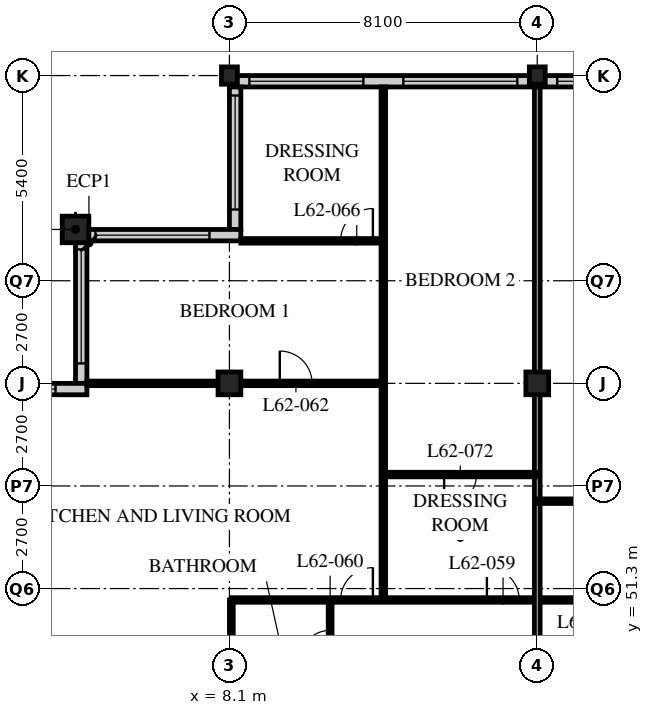
"""IFC4 building model, lengths in metres.
Left out: names, types, materials, properties, quantities, classifications, styles, units other than length and angle.
Written with IfcOpenShell. Run it as: python <this file> out.ifc"""

import sys

from ifc_helpers import new_model, si_unit, direction, frame, frame_2d, origin, origin_2d, place, context, subcontext, project, spatial, rectangle, hollow_rectangle, i_section, extrude, element, fill, save


model = new_model("IFC4")
c1 = context("Model", 3, precision=1e-05, world=origin(), true_north=direction((0.0, 1.0)))
c2 = subcontext(c1, "Body", "Model", "MODEL_VIEW")
j1 = project(units=[si_unit("LENGTHUNIT", "METRE"), si_unit("PLANEANGLEUNIT", "RADIAN")], contexts=[c1])
p1 = place(None, origin())
s1 = spatial("IfcSite", under=j1, at=p1, CompositionType="ELEMENT")
p2 = place(p1, origin())
s2 = spatial("IfcBuilding", under=s1, at=p2, CompositionType="ELEMENT")
p3 = place(p2, frame((0.0, 0.0, 242.4)))
s3 = spatial("IfcBuildingStorey", under=s2, at=p3, CompositionType="ELEMENT", Elevation=242.4)
p4 = place(p3, frame((4.05, 60.75, 0.0), z_axis=(0.0, 0.0, 1.0), x_axis=(1.0, 0.0, 0.0)))
e1 = element("IfcColumn", 1, at=p4, inside=s3, PredefinedType="COLUMN", context=c2, shape_type="SweptSolid", body=[
    extrude(hollow_rectangle(XDim=0.7, YDim=0.7, WallThickness=0.07, at=origin_2d()), origin(), (0.0, 0.0, 1.0), 3.9),
])
p5 = place(p3, frame((8.1, 56.7, 0.0), z_axis=(0.0, 0.0, 1.0), x_axis=(1.0, 0.0, 0.0)))
e2 = element("IfcColumn", 2, at=p5, inside=s3, PredefinedType="COLUMN", context=c2, shape_type="SweptSolid", body=[
    extrude(hollow_rectangle(XDim=0.6, YDim=0.6, WallThickness=0.05, at=origin_2d()), origin(), (0.0, 0.0, 1.0), 3.9),
])
p6 = place(p3, frame((8.1, 64.8, 0.0), z_axis=(0.0, 0.0, 1.0), x_axis=(1.0, 0.0, 0.0)))
e3 = element("IfcColumn", 3, at=p6, inside=s3, PredefinedType="COLUMN", context=c2, shape_type="SweptSolid", body=[
    extrude(i_section(OverallWidth=0.418, OverallDepth=0.456, WebThickness=0.042, FlangeThickness=0.067, FilletRadius=0.015, at=origin_2d()), origin(), (0.0, 0.0, 1.0), 3.9),
])
p7 = place(p3, frame((16.2, 56.7, 0.0), z_axis=(0.0, 0.0, 1.0), x_axis=(1.0, 0.0, 0.0)))
e4 = element("IfcColumn", 4, at=p7, inside=s3, PredefinedType="COLUMN", context=c2, shape_type="SweptSolid", body=[
    extrude(hollow_rectangle(XDim=0.6, YDim=0.6, WallThickness=0.05, at=origin_2d()), origin(), (0.0, 0.0, 1.0), 3.9),
])
p8 = place(p3, frame((16.2, 64.8, 0.0), z_axis=(0.0, 0.0, 1.0), x_axis=(1.0, 0.0, 0.0)))
e5 = element("IfcColumn", 5, at=p8, inside=s3, PredefinedType="COLUMN", context=c2, shape_type="SweptSolid", body=[
    extrude(i_section(OverallWidth=0.418, OverallDepth=0.456, WebThickness=0.042, FlangeThickness=0.067, FilletRadius=0.015, at=origin_2d()), origin(), (0.0, 0.0, 1.0), 3.9),
])
p9 = place(p3, frame((48.3, 64.65, 0.0), z_axis=(0.0, 0.0, 1.0), x_axis=(-1.0, 0.0, 0.0)))
e6 = element("IfcWall", 6, at=p9, inside=s3, PredefinedType="SOLIDWALL", context=c2, shape_type="SweptSolid", body=[
    extrude(rectangle(XDim=40.2, YDim=0.3, at=frame_2d((20.1, 0.0))), origin(), (0.0, 0.0, 1.0), 3.69),
])
p10 = place(p9, frame((0.225, 0.0, 0.6)))
e7 = element("IfcOpeningElement", 7, at=p10, cuts=e6, PredefinedType="OPENING", context=c2, shape_type="SweptSolid", body=[
    extrude(rectangle(XDim=3.0, YDim=2.3, at=frame_2d((1.5, 1.15))), frame((0.0, 0.16, 0.0), z_axis=(0.0, -1.0, 0.0), x_axis=(1.0, 0.0, 0.0)), (0.0, 0.0, 1.0), 0.32),
])
p11 = place(p9, frame((4.275, 0.0, 0.6)))
e8 = element("IfcOpeningElement", 8, at=p11, cuts=e6, PredefinedType="OPENING", context=c2, shape_type="SweptSolid", body=[
    extrude(rectangle(XDim=3.0, YDim=2.3, at=frame_2d((1.5, 1.15))), frame((0.0, 0.16, 0.0), z_axis=(0.0, -1.0, 0.0), x_axis=(1.0, 0.0, 0.0)), (0.0, 0.0, 1.0), 0.32),
])
p12 = place(p9, frame((8.325, 0.0, 0.6)))
e9 = element("IfcOpeningElement", 9, at=p12, cuts=e6, PredefinedType="OPENING", context=c2, shape_type="SweptSolid", body=[
    extrude(rectangle(XDim=3.0, YDim=2.3, at=frame_2d((1.5, 1.15))), frame((0.0, 0.16, 0.0), z_axis=(0.0, -1.0, 0.0), x_axis=(1.0, 0.0, 0.0)), (0.0, 0.0, 1.0), 0.32),
])
p13 = place(p9, frame((12.375, 0.0, 0.6)))
e10 = element("IfcOpeningElement", 10, at=p13, cuts=e6, PredefinedType="OPENING", context=c2, shape_type="SweptSolid", body=[
    extrude(rectangle(XDim=3.0, YDim=2.3, at=frame_2d((1.5, 1.15))), frame((0.0, 0.16, 0.0), z_axis=(0.0, -1.0, 0.0), x_axis=(1.0, 0.0, 0.0)), (0.0, 0.0, 1.0), 0.32),
])
p14 = place(p9, frame((16.425, 0.0, 0.6)))
e11 = element("IfcOpeningElement", 11, at=p14, cuts=e6, PredefinedType="OPENING", context=c2, shape_type="SweptSolid", body=[
    extrude(rectangle(XDim=3.0, YDim=2.3, at=frame_2d((1.5, 1.15))), frame((0.0, 0.16, 0.0), z_axis=(0.0, -1.0, 0.0), x_axis=(1.0, 0.0, 0.0)), (0.0, 0.0, 1.0), 0.32),
])
p15 = place(p9, frame((20.475, 0.0, 0.6)))
e12 = element("IfcOpeningElement", 12, at=p15, cuts=e6, PredefinedType="OPENING", context=c2, shape_type="SweptSolid", body=[
    extrude(rectangle(XDim=3.0, YDim=2.3, at=frame_2d((1.5, 1.15))), frame((0.0, 0.16, 0.0), z_axis=(0.0, -1.0, 0.0), x_axis=(1.0, 0.0, 0.0)), (0.0, 0.0, 1.0), 0.32),
])
p16 = place(p9, frame((24.525, 0.0, 0.6)))
e13 = element("IfcOpeningElement", 13, at=p16, cuts=e6, PredefinedType="OPENING", context=c2, shape_type="SweptSolid", body=[
    extrude(rectangle(XDim=3.0, YDim=2.3, at=frame_2d((1.5, 1.15))), frame((0.0, 0.16, 0.0), z_axis=(0.0, -1.0, 0.0), x_axis=(1.0, 0.0, 0.0)), (0.0, 0.0, 1.0), 0.32),
])
p17 = place(p9, frame((28.575, 0.0, 0.6)))
e14 = element("IfcOpeningElement", 14, at=p17, cuts=e6, PredefinedType="OPENING", context=c2, shape_type="SweptSolid", body=[
    extrude(rectangle(XDim=3.0, YDim=2.3, at=frame_2d((1.5, 1.15))), frame((0.0, 0.16, 0.0), z_axis=(0.0, -1.0, 0.0), x_axis=(1.0, 0.0, 0.0)), (0.0, 0.0, 1.0), 0.32),
])
p18 = place(p9, frame((32.625, 0.0, 0.6)))
e15 = element("IfcOpeningElement", 15, at=p18, cuts=e6, PredefinedType="OPENING", context=c2, shape_type="SweptSolid", body=[
    extrude(rectangle(XDim=3.0, YDim=2.3, at=frame_2d((1.5, 1.15))), frame((0.0, 0.16, 0.0), z_axis=(0.0, -1.0, 0.0), x_axis=(1.0, 0.0, 0.0)), (0.0, 0.0, 1.0), 0.32),
])
p19 = place(p9, frame((36.675, 0.0, 0.6)))
e16 = element("IfcOpeningElement", 16, at=p19, cuts=e6, PredefinedType="OPENING", context=c2, shape_type="SweptSolid", body=[
    extrude(rectangle(XDim=3.0, YDim=2.3, at=frame_2d((1.5, 1.15))), frame((0.0, 0.16, 0.0), z_axis=(0.0, -1.0, 0.0), x_axis=(1.0, 0.0, 0.0)), (0.0, 0.0, 1.0), 0.32),
])
p20 = place(p3, frame((8.25, 64.5, 0.0), z_axis=(0.0, 0.0, 1.0), x_axis=(0.0, -1.0, 0.0)))
e17 = element("IfcWall", 17, at=p20, inside=s3, PredefinedType="SOLIDWALL", context=c2, shape_type="SweptSolid", body=[
    extrude(rectangle(XDim=3.75, YDim=0.3, at=frame_2d((1.875, 0.0))), origin(), (0.0, 0.0, 1.0), 3.69),
])
p21 = place(p20, frame((0.225, 0.0, 0.6)))
e18 = element("IfcOpeningElement", 18, at=p21, cuts=e17, PredefinedType="OPENING", context=c2, shape_type="SweptSolid", body=[
    extrude(rectangle(XDim=3.0, YDim=2.3, at=frame_2d((1.5, 1.15))), frame((0.0, 0.16, 0.0), z_axis=(0.0, -1.0, 0.0), x_axis=(1.0, 0.0, 0.0)), (0.0, 0.0, 1.0), 0.32),
])
p22 = place(p3, frame((8.4, 60.6, 0.0), z_axis=(0.0, 0.0, 1.0), x_axis=(-1.0, 0.0, 0.0)))
e19 = element("IfcWall", 19, at=p22, inside=s3, PredefinedType="SOLIDWALL", context=c2, shape_type="SweptSolid", body=[
    extrude(rectangle(XDim=4.35, YDim=0.3, at=frame_2d((2.175, 0.0))), origin(), (0.0, 0.0, 1.0), 3.69),
])
p23 = place(p22, frame((0.825, 0.0, 0.6)))
e20 = element("IfcOpeningElement", 20, at=p23, cuts=e19, PredefinedType="OPENING", context=c2, shape_type="SweptSolid", body=[
    extrude(rectangle(XDim=3.0, YDim=2.3, at=frame_2d((1.5, 1.15))), frame((0.0, 0.16, 0.0), z_axis=(0.0, -1.0, 0.0), x_axis=(1.0, 0.0, 0.0)), (0.0, 0.0, 1.0), 0.32),
])
p24 = place(p3, frame((4.2, 60.45, 0.0), z_axis=(0.0, 0.0, 1.0), x_axis=(0.0, -1.0, 0.0)))
e21 = element("IfcWall", 21, at=p24, inside=s3, PredefinedType="SOLIDWALL", context=c2, shape_type="SweptSolid", body=[
    extrude(rectangle(XDim=3.75, YDim=0.3, at=frame_2d((1.875, 0.0))), origin(), (0.0, 0.0, 1.0), 3.69),
])
p25 = place(p24, frame((0.225, 0.0, 0.6)))
e22 = element("IfcOpeningElement", 22, at=p25, cuts=e21, PredefinedType="OPENING", context=c2, shape_type="SweptSolid", body=[
    extrude(rectangle(XDim=3.0, YDim=2.3, at=frame_2d((1.5, 1.15))), frame((0.0, 0.16, 0.0), z_axis=(0.0, -1.0, 0.0), x_axis=(1.0, 0.0, 0.0)), (0.0, 0.0, 1.0), 0.32),
])
p26 = place(p3, frame((4.35, 56.55, 0.0), z_axis=(0.0, 0.0, 1.0), x_axis=(-1.0, 0.0, 0.0)))
e23 = element("IfcWall", 23, at=p26, inside=s3, PredefinedType="SOLIDWALL", context=c2, shape_type="SweptSolid", body=[
    extrude(rectangle(XDim=4.35, YDim=0.3, at=frame_2d((2.175, 0.0))), origin(), (0.0, 0.0, 1.0), 3.69),
])
p27 = place(p26, frame((0.825, 0.0, 0.6)))
e24 = element("IfcOpeningElement", 24, at=p27, cuts=e23, PredefinedType="OPENING", context=c2, shape_type="SweptSolid", body=[
    extrude(rectangle(XDim=3.0, YDim=2.3, at=frame_2d((1.5, 1.15))), frame((0.0, 0.16, 0.0), z_axis=(0.0, -1.0, 0.0), x_axis=(1.0, 0.0, 0.0)), (0.0, 0.0, 1.0), 0.32),
])
p28 = place(p3, frame((10.75, 48.6, 0.0), z_axis=(0.0, 0.0, 1.0), x_axis=(0.0, 1.0, 0.0)))
e25 = element("IfcWall", 25, at=p28, inside=s3, PredefinedType="PARTITIONING", context=c2, shape_type="SweptSolid", body=[
    extrude(rectangle(XDim=2.4, YDim=0.1, at=frame_2d((1.2, 0.0))), origin(), (0.0, 0.0, 1.0), 3.69),
])
p29 = place(p28, frame((0.8, 0.0, 0.0)))
e26 = element("IfcOpeningElement", 26, at=p29, cuts=e25, PredefinedType="OPENING", context=c2, shape_type="SweptSolid", body=[
    extrude(rectangle(XDim=0.8, YDim=2.1, at=frame_2d((0.4, 1.05))), frame((0.0, 0.06, 0.0), z_axis=(0.0, -1.0, 0.0), x_axis=(1.0, 0.0, 0.0)), (0.0, 0.0, 1.0), 0.12),
])
p30 = place(p3, frame((8.15, 48.6, 0.0), z_axis=(0.0, 0.0, 1.0), x_axis=(0.0, 1.0, 0.0)))
e27 = element("IfcWall", 27, at=p30, inside=s3, PredefinedType="PARTITIONING", context=c2, shape_type="SweptSolid", body=[
    extrude(rectangle(XDim=2.4, YDim=0.1, at=frame_2d((1.2, 0.0))), origin(), (0.0, 0.0, 1.0), 2.928),
])
p31 = place(p3, frame((8.15, 51.0, 0.0), z_axis=(0.0, 0.0, 1.0), x_axis=(1.0, 0.0, 0.0)))
e28 = element("IfcWall", 28, at=p31, inside=s3, PredefinedType="PARTITIONING", context=c2, shape_type="SweptSolid", body=[
    extrude(rectangle(XDim=40.4, YDim=0.12, at=frame_2d((20.2, 0.0))), origin(), (0.0, 0.0, 1.0), 3.69),
])
p32 = place(p31, frame((9.025, 0.0, 0.0)))
e29 = element("IfcOpeningElement", 29, at=p32, cuts=e28, PredefinedType="OPENING", context=c2, shape_type="SweptSolid", body=[
    extrude(rectangle(XDim=0.85, YDim=2.1, at=frame_2d((0.425, 1.05))), frame((0.0, 0.07, 0.0), z_axis=(0.0, -1.0, 0.0), x_axis=(1.0, 0.0, 0.0)), (0.0, 0.0, 1.0), 0.14),
])
p33 = place(p31, frame((16.475, 0.0, 0.0)))
e30 = element("IfcOpeningElement", 30, at=p33, cuts=e28, PredefinedType="OPENING", context=c2, shape_type="SweptSolid", body=[
    extrude(rectangle(XDim=0.85, YDim=2.1, at=frame_2d((0.425, 1.05))), frame((0.0, 0.07, 0.0), z_axis=(0.0, -1.0, 0.0), x_axis=(1.0, 0.0, 0.0)), (0.0, 0.0, 1.0), 0.14),
])
p34 = place(p31, frame((20.525, 0.0, 0.0)))
e31 = element("IfcOpeningElement", 31, at=p34, cuts=e28, PredefinedType="OPENING", context=c2, shape_type="SweptSolid", body=[
    extrude(rectangle(XDim=0.85, YDim=2.1, at=frame_2d((0.425, 1.05))), frame((0.0, 0.07, 0.0), z_axis=(0.0, -1.0, 0.0), x_axis=(1.0, 0.0, 0.0)), (0.0, 0.0, 1.0), 0.14),
])
p35 = place(p31, frame((25.225, 0.0, 0.0)))
e32 = element("IfcOpeningElement", 32, at=p35, cuts=e28, PredefinedType="OPENING", context=c2, shape_type="SweptSolid", body=[
    extrude(rectangle(XDim=0.85, YDim=2.1, at=frame_2d((0.425, 1.05))), frame((0.0, 0.07, 0.0), z_axis=(0.0, -1.0, 0.0), x_axis=(1.0, 0.0, 0.0)), (0.0, 0.0, 1.0), 0.14),
])
p36 = place(p31, frame((28.625, 0.0, 0.0)))
e33 = element("IfcOpeningElement", 33, at=p36, cuts=e28, PredefinedType="OPENING", context=c2, shape_type="SweptSolid", body=[
    extrude(rectangle(XDim=0.85, YDim=2.1, at=frame_2d((0.425, 1.05))), frame((0.0, 0.07, 0.0), z_axis=(0.0, -1.0, 0.0), x_axis=(1.0, 0.0, 0.0)), (0.0, 0.0, 1.0), 0.14),
])
p37 = place(p31, frame((32.825, 0.0, 0.0)))
e34 = element("IfcOpeningElement", 34, at=p37, cuts=e28, PredefinedType="OPENING", context=c2, shape_type="SweptSolid", body=[
    extrude(rectangle(XDim=0.85, YDim=2.1, at=frame_2d((0.425, 1.05))), frame((0.0, 0.07, 0.0), z_axis=(0.0, -1.0, 0.0), x_axis=(1.0, 0.0, 0.0)), (0.0, 0.0, 1.0), 0.14),
])
p38 = place(p31, frame((36.675, 0.0, 0.0)))
e35 = element("IfcOpeningElement", 35, at=p38, cuts=e28, PredefinedType="OPENING", context=c2, shape_type="SweptSolid", body=[
    extrude(rectangle(XDim=0.85, YDim=2.1, at=frame_2d((0.425, 1.05))), frame((0.0, 0.07, 0.0), z_axis=(0.0, -1.0, 0.0), x_axis=(1.0, 0.0, 0.0)), (0.0, 0.0, 1.0), 0.14),
])
p39 = place(p31, frame((6.725, 0.0, 0.0)))
e36 = element("IfcOpeningElement", 36, at=p39, cuts=e28, PredefinedType="OPENING", context=c2, shape_type="SweptSolid", body=[
    extrude(rectangle(XDim=0.85, YDim=2.1, at=frame_2d((0.425, 1.05))), frame((0.0, 0.07, 0.0), z_axis=(0.0, -1.0, 0.0), x_axis=(1.0, 0.0, 0.0)), (0.0, 0.0, 1.0), 0.14),
])
p40 = place(p31, frame((2.875, 0.0, 0.0)))
e37 = element("IfcOpeningElement", 37, at=p40, cuts=e28, PredefinedType="OPENING", context=c2, shape_type="SweptSolid", body=[
    extrude(rectangle(XDim=0.85, YDim=2.1, at=frame_2d((0.425, 1.05))), frame((0.0, 0.07, 0.0), z_axis=(0.0, -1.0, 0.0), x_axis=(1.0, 0.0, 0.0)), (0.0, 0.0, 1.0), 0.14),
])
p41 = place(p3, frame((12.15, 51.0, 0.0), z_axis=(0.0, 0.0, 1.0), x_axis=(0.0, 1.0, 0.0)))
e38 = element("IfcWall", 38, at=p41, inside=s3, PredefinedType="PARTITIONING", context=c2, shape_type="SweptSolid", body=[
    extrude(rectangle(XDim=13.5, YDim=0.12, at=frame_2d((6.75, 0.0))), origin(), (0.0, 0.0, 1.0), 3.69),
])
p42 = place(p3, frame((12.15, 56.7, 0.0), z_axis=(0.0, 0.0, 1.0), x_axis=(-1.0, 0.0, 0.0)))
e39 = element("IfcWall", 39, at=p42, inside=s3, PredefinedType="PARTITIONING", context=c2, shape_type="SweptSolid", body=[
    extrude(rectangle(XDim=7.8, YDim=0.12, at=frame_2d((3.9, 0.0))), origin(), (0.0, 0.0, 1.0), 2.928),
])
p43 = place(p42, frame((1.875, 0.0, 0.0)))
e40 = element("IfcOpeningElement", 40, at=p43, cuts=e39, PredefinedType="OPENING", context=c2, shape_type="SweptSolid", body=[
    extrude(rectangle(XDim=0.85, YDim=2.1, at=frame_2d((0.425, 1.05))), frame((0.0, 0.07, 0.0), z_axis=(0.0, -1.0, 0.0), x_axis=(1.0, 0.0, 0.0)), (0.0, 0.0, 1.0), 0.14),
])
p44 = place(p3, frame((16.2, 48.6, 0.0), z_axis=(0.0, 0.0, 1.0), x_axis=(0.0, 1.0, 0.0)))
e41 = element("IfcWall", 41, at=p44, inside=s3, PredefinedType="PARTITIONING", context=c2, shape_type="SweptSolid", body=[
    extrude(rectangle(XDim=15.9, YDim=0.15, at=frame_2d((7.95, 0.0))), origin(), (0.0, 0.0, 1.0), 2.928),
])
p45 = place(p3, frame((12.15, 60.45, 0.0), z_axis=(0.0, 0.0, 1.0), x_axis=(-1.0, 0.0, 0.0)))
e42 = element("IfcWall", 42, at=p45, inside=s3, PredefinedType="PARTITIONING", context=c2, shape_type="SweptSolid", body=[
    extrude(rectangle(XDim=3.75, YDim=0.12, at=frame_2d((1.875, 0.0))), origin(), (0.0, 0.0, 1.0), 3.69),
])
p46 = place(p45, frame((0.275, 0.0, 0.0)))
e43 = element("IfcOpeningElement", 43, at=p46, cuts=e42, PredefinedType="OPENING", context=c2, shape_type="SweptSolid", body=[
    extrude(rectangle(XDim=0.85, YDim=2.1, at=frame_2d((0.425, 1.05))), frame((0.0, 0.07, 0.0), z_axis=(0.0, -1.0, 0.0), x_axis=(1.0, 0.0, 0.0)), (0.0, 0.0, 1.0), 0.14),
])
p47 = place(p3, frame((16.2, 53.6, 0.0), z_axis=(0.0, 0.0, 1.0), x_axis=(1.0, 0.0, 0.0)))
e44 = element("IfcWall", 44, at=p47, inside=s3, PredefinedType="PARTITIONING", context=c2, shape_type="SweptSolid", body=[
    extrude(rectangle(XDim=8.1, YDim=0.12, at=frame_2d((4.05, 0.0))), origin(), (0.0, 0.0, 1.0), 3.69),
])
p48 = place(p47, frame((3.625, 0.0, 0.0)))
e45 = element("IfcOpeningElement", 45, at=p48, cuts=e44, PredefinedType="OPENING", context=c2, shape_type="SweptSolid", body=[
    extrude(rectangle(XDim=0.85, YDim=2.1, at=frame_2d((0.425, 1.05))), frame((0.0, 0.07, 0.0), z_axis=(0.0, -1.0, 0.0), x_axis=(1.0, 0.0, 0.0)), (0.0, 0.0, 1.0), 0.14),
])
p49 = place(p3, frame((12.15, 54.3, 0.0), z_axis=(0.0, 0.0, 1.0), x_axis=(1.0, 0.0, 0.0)))
e46 = element("IfcWall", 46, at=p49, inside=s3, PredefinedType="PARTITIONING", context=c2, shape_type="SweptSolid", body=[
    extrude(rectangle(XDim=4.05, YDim=0.12, at=frame_2d((2.025, 0.0))), origin(), (0.0, 0.0, 1.0), 3.69),
])
p50 = place(p49, frame((1.6, 0.0, 0.0)))
e47 = element("IfcOpeningElement", 47, at=p50, cuts=e46, PredefinedType="OPENING", context=c2, shape_type="SweptSolid", body=[
    extrude(rectangle(XDim=0.85, YDim=2.1, at=frame_2d((0.425, 1.05))), frame((0.0, 0.07, 0.0), z_axis=(0.0, -1.0, 0.0), x_axis=(1.0, 0.0, 0.0)), (0.0, 0.0, 1.0), 0.14),
])
p51 = place(p17, origin())
e48 = element("IfcWindow", 48, at=p51, inside=s3, PartitioningType="SINGLE_PANEL", PredefinedType="WINDOW", context=c2, shape_type="SweptSolid", body=[
    extrude(rectangle(XDim=3.0, YDim=2.3, at=frame_2d((1.5, 1.15))), frame((0.0, 0.03, 0.0), z_axis=(0.0, -1.0, 0.0), x_axis=(1.0, 0.0, 0.0)), (0.0, 0.0, 1.0), 0.06),
])
fill(e14, e48)
p52 = place(p18, origin())
e49 = element("IfcWindow", 49, at=p52, inside=s3, PartitioningType="SINGLE_PANEL", PredefinedType="WINDOW", context=c2, shape_type="SweptSolid", body=[
    extrude(rectangle(XDim=3.0, YDim=2.3, at=frame_2d((1.5, 1.15))), frame((0.0, 0.03, 0.0), z_axis=(0.0, -1.0, 0.0), x_axis=(1.0, 0.0, 0.0)), (0.0, 0.0, 1.0), 0.06),
])
fill(e15, e49)
p53 = place(p19, origin())
e50 = element("IfcWindow", 50, at=p53, inside=s3, PartitioningType="SINGLE_PANEL", PredefinedType="WINDOW", context=c2, shape_type="SweptSolid", body=[
    extrude(rectangle(XDim=3.0, YDim=2.3, at=frame_2d((1.5, 1.15))), frame((0.0, 0.03, 0.0), z_axis=(0.0, -1.0, 0.0), x_axis=(1.0, 0.0, 0.0)), (0.0, 0.0, 1.0), 0.06),
])
fill(e16, e50)
p54 = place(p21, origin())
e51 = element("IfcWindow", 51, at=p54, inside=s3, PartitioningType="SINGLE_PANEL", PredefinedType="WINDOW", context=c2, shape_type="SweptSolid", body=[
    extrude(rectangle(XDim=3.0, YDim=2.3, at=frame_2d((1.5, 1.15))), frame((0.0, 0.03, 0.0), z_axis=(0.0, -1.0, 0.0), x_axis=(1.0, 0.0, 0.0)), (0.0, 0.0, 1.0), 0.06),
])
fill(e18, e51)
p55 = place(p23, origin())
e52 = element("IfcWindow", 52, at=p55, inside=s3, PartitioningType="SINGLE_PANEL", PredefinedType="WINDOW", context=c2, shape_type="SweptSolid", body=[
    extrude(rectangle(XDim=3.0, YDim=2.3, at=frame_2d((1.5, 1.15))), frame((0.0, 0.03, 0.0), z_axis=(0.0, -1.0, 0.0), x_axis=(1.0, 0.0, 0.0)), (0.0, 0.0, 1.0), 0.06),
])
fill(e20, e52)
p56 = place(p25, origin())
e53 = element("IfcWindow", 53, at=p56, inside=s3, PartitioningType="SINGLE_PANEL", PredefinedType="WINDOW", context=c2, shape_type="SweptSolid", body=[
    extrude(rectangle(XDim=3.0, YDim=2.3, at=frame_2d((1.5, 1.15))), frame((0.0, 0.03, 0.0), z_axis=(0.0, -1.0, 0.0), x_axis=(1.0, 0.0, 0.0)), (0.0, 0.0, 1.0), 0.06),
])
fill(e22, e53)
p57 = place(p27, origin())
e54 = element("IfcWindow", 54, at=p57, inside=s3, PartitioningType="SINGLE_PANEL", PredefinedType="WINDOW", context=c2, shape_type="SweptSolid", body=[
    extrude(rectangle(XDim=3.0, YDim=2.3, at=frame_2d((1.5, 1.15))), frame((0.0, 0.03, 0.0), z_axis=(0.0, -1.0, 0.0), x_axis=(1.0, 0.0, 0.0)), (0.0, 0.0, 1.0), 0.06),
])
fill(e24, e54)
p58 = place(p39, origin())
e55 = element("IfcDoor", 55, at=p58, inside=s3, OperationType="SINGLE_SWING_LEFT", PredefinedType="DOOR", context=c2, shape_type="SweptSolid", body=[
    extrude(rectangle(XDim=0.85, YDim=2.1, at=frame_2d((0.425, 1.05))), frame((0.0, 0.025, 0.0), z_axis=(0.0, -1.0, 0.0), x_axis=(1.0, 0.0, 0.0)), (0.0, 0.0, 1.0), 0.05),
])
fill(e36, e55)
p59 = place(p29, origin())
e56 = element("IfcDoor", 56, at=p59, inside=s3, OperationType="SINGLE_SWING_LEFT", PredefinedType="DOOR", context=c2, shape_type="SweptSolid", body=[
    extrude(rectangle(XDim=0.8, YDim=2.1, at=frame_2d((0.4, 1.05))), frame((0.0, 0.025, 0.0), z_axis=(0.0, -1.0, 0.0), x_axis=(1.0, 0.0, 0.0)), (0.0, 0.0, 1.0), 0.05),
])
fill(e26, e56)
p60 = place(p40, origin())
e57 = element("IfcDoor", 57, at=p60, inside=s3, OperationType="SINGLE_SWING_RIGHT", PredefinedType="DOOR", context=c2, shape_type="SweptSolid", body=[
    extrude(rectangle(XDim=0.85, YDim=2.1, at=frame_2d((0.425, 1.05))), frame((0.0, 0.025, 0.0), z_axis=(0.0, -1.0, 0.0), x_axis=(1.0, 0.0, 0.0)), (0.0, 0.0, 1.0), 0.05),
])
fill(e37, e57)
p61 = place(p43, origin())
e58 = element("IfcDoor", 58, at=p61, inside=s3, OperationType="SINGLE_SWING_LEFT", PredefinedType="DOOR", context=c2, shape_type="SweptSolid", body=[
    extrude(rectangle(XDim=0.85, YDim=2.1, at=frame_2d((0.425, 1.05))), frame((0.0, 0.025, 0.0), z_axis=(0.0, -1.0, 0.0), x_axis=(1.0, 0.0, 0.0)), (0.0, 0.0, 1.0), 0.05),
])
fill(e40, e58)
p62 = place(p46, origin())
e59 = element("IfcDoor", 59, at=p62, inside=s3, OperationType="SINGLE_SWING_RIGHT", PredefinedType="DOOR", context=c2, shape_type="SweptSolid", body=[
    extrude(rectangle(XDim=0.85, YDim=2.1, at=frame_2d((0.425, 1.05))), frame((0.0, 0.025, 0.0), z_axis=(0.0, -1.0, 0.0), x_axis=(1.0, 0.0, 0.0)), (0.0, 0.0, 1.0), 0.05),
])
fill(e43, e59)
p63 = place(p50, origin())
e60 = element("IfcDoor", 60, at=p63, inside=s3, OperationType="SINGLE_SWING_RIGHT", PredefinedType="DOOR", context=c2, shape_type="SweptSolid", body=[
    extrude(rectangle(XDim=0.85, YDim=2.1, at=frame_2d((0.425, 1.05))), frame((0.0, 0.025, 0.0), z_axis=(0.0, -1.0, 0.0), x_axis=(1.0, 0.0, 0.0)), (0.0, 0.0, 1.0), 0.05),
])
fill(e47, e60)
save(model, sys.argv[1])
